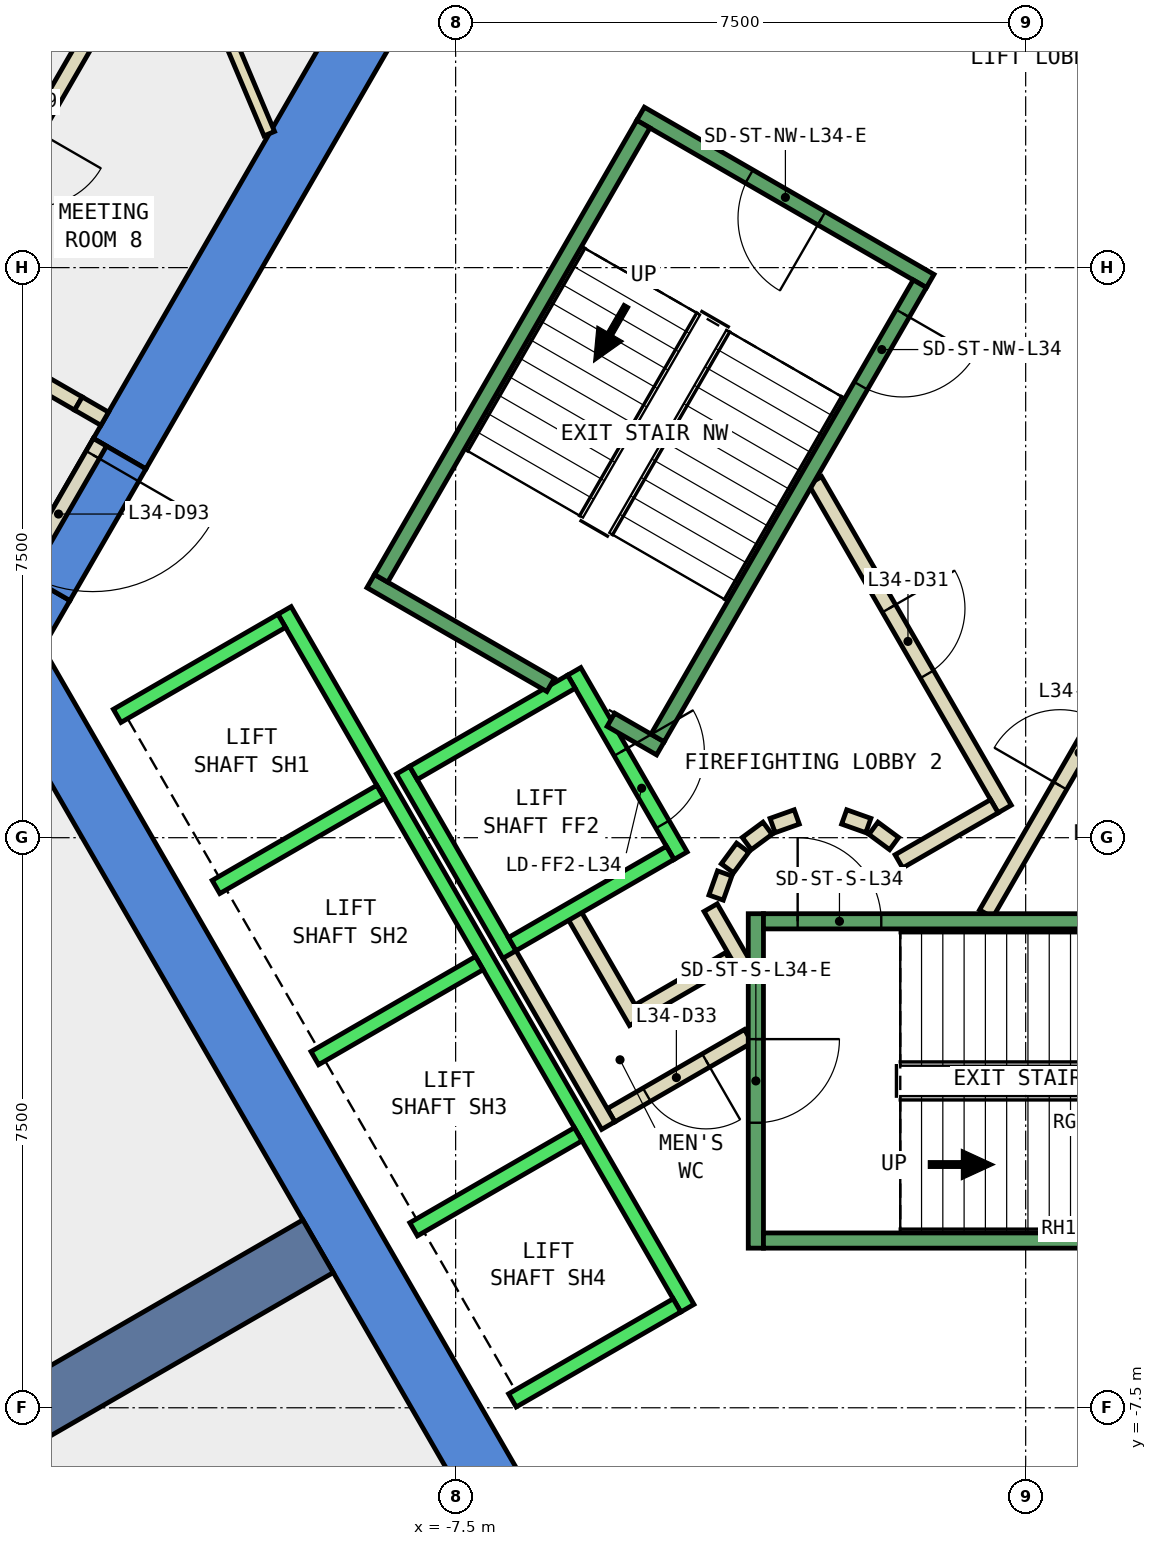
"""IFC4 building model, lengths in metres.
Left out: names, types, materials, properties, quantities, classifications, styles, units other than length and angle.
Written with IfcOpenShell. Run it as: python <this file> out.ifc"""

import sys

from ifc_helpers import new_model, si_unit, direction, frame, frame_2d, origin, place, context, subcontext, project, spatial, polyline, rectangle, outline, extrude, element, fill, save


model = new_model("IFC4")
c1 = context("Model", 3, precision=1e-05, world=origin(), true_north=direction((0.0, 1.0)))
c2 = subcontext(c1, "Body", "Model", "MODEL_VIEW")
j1 = project(units=[si_unit("LENGTHUNIT", "METRE"), si_unit("PLANEANGLEUNIT", "RADIAN")], contexts=[c1])
p1 = place(None, origin())
s1 = spatial("IfcSite", under=j1, at=p1, CompositionType="ELEMENT")
p2 = place(p1, origin())
s2 = spatial("IfcBuilding", under=s1, at=p2, CompositionType="ELEMENT")
p3 = place(p2, frame((0.0, 0.0, 155.0)))
s3 = spatial("IfcBuildingStorey", under=s2, at=p3, CompositionType="ELEMENT", Elevation=155.0)
p4 = place(p3, frame((0.0, 0.0, -0.4)))
e1 = element("IfcWall", 1, at=p4, inside=s3, PredefinedType="SHEAR", context=c2, shape_type="SweptSolid", body=[
    extrude(outline(polyline([(-12.267, 5.252), (-11.575, 4.852), (-6.466, 13.7), (-6.928, 14.5), (-12.267, 5.252)])), origin(), (0.0, 0.0, 1.0), 4.2),
])
p5 = place(p3, frame((0.0, 0.0, -0.4)))
e2 = element("IfcWall", 2, at=p5, inside=s3, PredefinedType="SHEAR", context=c2, shape_type="SweptSolid", body=[
    extrude(outline(polyline([(-12.575, 3.12), (-13.267, 3.52), (-13.856, 2.5), (-12.933, 2.5), (-12.575, 3.12)])), origin(), (0.0, 0.0, 1.0), 4.2),
])
p6 = place(p3, frame((0.0, 0.0, 3.6)))
e3 = element("IfcWall", 3, at=p6, inside=s3, PredefinedType="SHEAR", context=c2, shape_type="SweptSolid", body=[
    extrude(outline(polyline([(-13.267, 3.52), (-12.575, 3.12), (-11.575, 4.852), (-12.267, 5.252), (-13.267, 3.52)])), origin(), (0.0, 0.0, 1.0), 0.2),
])
p7 = place(p3, frame((0.0, 0.0, -0.4)))
e4 = element("IfcWall", 4, at=p7, inside=s3, PredefinedType="SHEAR", context=c2, shape_type="SweptSolid", body=[
    extrude(outline(polyline([(-13.856, 2.5), (-6.928, -9.5), (-6.466, -8.7), (-12.933, 2.5), (-13.856, 2.5)])), origin(), (0.0, 0.0, 1.0), 4.2),
])
p8 = place(p3, frame((-9.31, -5.375, -0.4), z_axis=(0.0, 0.0, 1.0), x_axis=(-0.866017533419, -0.500013631625, 0.0)))
e5 = element("IfcWall", 5, at=p8, inside=s3, PredefinedType="SHEAR", context=c2, shape_type="SweptSolid", body=[
    extrude(rectangle(XDim=9.0, YDim=0.8, at=frame_2d((4.5, 0.0))), origin(), (0.0, 0.0, 1.0), 4.2),
])
p9 = place(p3, frame((-12.067, 10.975, 0.0), z_axis=(0.0, 0.0, 1.0), x_axis=(-0.500215616273, -0.865900881878, 0.0)))
e6 = element("IfcWall", 6, at=p9, inside=s3, PredefinedType="PARTITIONING", context=c2, shape_type="SweptSolid", body=[
    extrude(rectangle(XDim=4.856, YDim=0.2, at=frame_2d((2.428, 0.0))), origin(), (0.0, 0.0, 1.0), 3.8),
])
p10 = place(p9, frame((1.928, 0.0, 0.0)))
e7 = element("IfcOpeningElement", 7, at=p10, cuts=e6, PredefinedType="OPENING", context=c2, shape_type="SweptSolid", body=[
    extrude(rectangle(XDim=1.0, YDim=2.1, at=frame_2d((0.5, 1.05))), frame((0.0, 0.11, 0.0), z_axis=(0.0, -1.0, 0.0), x_axis=(1.0, 0.0, 0.0)), (0.0, 0.0, 1.0), 0.22),
])
p11 = place(p3, frame((-14.359, 6.806, 0.0), z_axis=(0.0, 0.0, 1.0), x_axis=(0.866155875717, -0.499773947861, 0.0)))
e8 = element("IfcWall", 8, at=p11, inside=s3, PredefinedType="PARTITIONING", context=c2, shape_type="SweptSolid", body=[
    extrude(rectangle(XDim=2.189, YDim=0.2, at=frame_2d((1.094, 0.0))), origin(), (0.0, 0.0, 1.0), 3.8),
])
p12 = place(p3, frame((-3.9, -1.599, 0.0), z_axis=(0.0, 0.0, 1.0), x_axis=(-0.865969445389, -0.500096910261, 0.0)))
e9 = element("IfcWall", 9, at=p12, inside=s3, PredefinedType="PARTITIONING", context=c2, shape_type="SweptSolid", body=[
    extrude(rectangle(XDim=1.373, YDim=0.2, at=frame_2d((0.687, 0.0))), origin(), (0.0, 0.0, 1.0), 3.8),
])
p13 = place(p3, frame((-5.126, -2.422, 0.0), z_axis=(0.0, 0.0, 1.0), x_axis=(-0.500062241894, 0.865989465428, 0.0)))
e10 = element("IfcWall", 10, at=p13, inside=s3, PredefinedType="PARTITIONING", context=c2, shape_type="SweptSolid", body=[
    extrude(rectangle(XDim=1.7, YDim=0.2, at=frame_2d((0.85, 0.0))), origin(), (0.0, 0.0, 1.0), 3.8),
])
p14 = place(p3, frame((-3.65, -2.61, 0.0), z_axis=(0.0, 0.0, 1.0), x_axis=(-0.866072462134, -0.499918483688, 0.0)))
e11 = element("IfcWall", 11, at=p14, inside=s3, PredefinedType="PARTITIONING", context=c2, shape_type="SweptSolid", body=[
    extrude(rectangle(XDim=2.084, YDim=0.2, at=frame_2d((1.042, 0.0))), origin(), (0.0, 0.0, 1.0), 3.8),
])
p15 = place(p14, frame((0.642, 0.0, 0.0)))
e12 = element("IfcOpeningElement", 12, at=p15, cuts=e11, PredefinedType="OPENING", context=c2, shape_type="SweptSolid", body=[
    extrude(rectangle(XDim=0.9, YDim=2.1, at=frame_2d((0.45, 1.05))), frame((0.0, 0.11, 0.0), z_axis=(0.0, -1.0, 0.0), x_axis=(1.0, 0.0, 0.0)), (0.0, 0.0, 1.0), 0.22),
])
p16 = place(p3, frame((-5.492, -3.788, 0.0), z_axis=(0.0, 0.0, 1.0), x_axis=(-0.500008949224, 0.866020236886, 0.0)))
e13 = element("IfcWall", 13, at=p16, inside=s3, PredefinedType="PARTITIONING", context=c2, shape_type="SweptSolid", body=[
    extrude(rectangle(XDim=2.68, YDim=0.2, at=frame_2d((1.34, 0.0))), origin(), (0.0, 0.0, 1.0), 3.8),
])
p17 = place(p3, frame((-4.145, -0.92, 0.0), z_axis=(0.0, 0.0, 1.0), x_axis=(0.499743786207, -0.866173278362, 0.0)))
e14 = element("IfcWall", 14, at=p17, inside=s3, PredefinedType="PARTITIONING", context=c2, shape_type="SweptSolid", body=[
    extrude(rectangle(XDim=0.991, YDim=0.2, at=frame_2d((0.495, 0.0))), origin(), (0.0, 0.0, 1.0), 3.8),
])
p18 = place(p3, frame((-9.952, 9.262, 0.0), z_axis=(0.0, 0.0, 1.0), x_axis=(-0.38905491579, 0.921214563769, 0.0)))
e15 = element("IfcWall", 15, at=p18, inside=s3, PredefinedType="PARTITIONING", context=c2, shape_type="SweptSolid", body=[
    extrude(rectangle(XDim=3.445, YDim=0.15, at=frame_2d((1.722, 0.0))), origin(), (0.0, 0.0, 1.0), 3.8),
])
p19 = place(p3, frame((-0.52, -1.0, 0.0), z_axis=(0.0, 0.0, 1.0), x_axis=(0.50011622646, 0.865958290007, 0.0)))
e16 = element("IfcWall", 16, at=p19, inside=s3, PredefinedType="PARTITIONING", context=c2, shape_type="SweptSolid", body=[
    extrude(rectangle(XDim=4.991, YDim=0.2, at=frame_2d((2.496, 0.0))), origin(), (0.0, 0.0, 1.0), 3.8),
])
p20 = place(p19, frame((1.945, 0.0, 0.0)))
e17 = element("IfcOpeningElement", 17, at=p20, cuts=e16, PredefinedType="OPENING", context=c2, shape_type="SweptSolid", body=[
    extrude(rectangle(XDim=1.0, YDim=2.1, at=frame_2d((0.5, 1.05))), frame((0.0, 0.11, 0.0), z_axis=(0.0, -1.0, 0.0), x_axis=(1.0, 0.0, 0.0)), (0.0, 0.0, 1.0), 0.22),
])
p21 = place(p3, frame((-2.771, 4.7, 0.0), z_axis=(0.0, 0.0, 1.0), x_axis=(0.499969479948, -0.866043023828, 0.0)))
e18 = element("IfcWall", 18, at=p21, inside=s3, PredefinedType="PARTITIONING", context=c2, shape_type="SweptSolid", body=[
    extrude(rectangle(XDim=4.99, YDim=0.2, at=frame_2d((2.495, 0.0))), origin(), (0.0, 0.0, 1.0), 3.8),
])
p22 = place(p21, frame((1.945, 0.0, 0.0)))
e19 = element("IfcOpeningElement", 19, at=p22, cuts=e18, PredefinedType="OPENING", context=c2, shape_type="SweptSolid", body=[
    extrude(rectangle(XDim=1.0, YDim=2.1, at=frame_2d((0.5, 1.05))), frame((0.0, 0.11, 0.0), z_axis=(0.0, -1.0, 0.0), x_axis=(1.0, 0.0, 0.0)), (0.0, 0.0, 1.0), 0.22),
])
p23 = place(p3, frame((-0.412, 0.414, 0.0), z_axis=(0.0, 0.0, 1.0), x_axis=(-0.866017369001, -0.500013916395, 0.0)))
e20 = element("IfcWall", 20, at=p23, inside=s3, PredefinedType="PARTITIONING", context=c2, shape_type="SweptSolid", body=[
    extrude(rectangle(XDim=1.45, YDim=0.2, at=frame_2d((0.725, 0.0))), origin(), (0.0, 0.0, 1.0), 3.8),
])
p24 = place(p3, frame((-1.731, -0.077, 0.0), z_axis=(0.0, 0.0, 1.0), x_axis=(-0.804311165252, 0.594208338422, 0.0)))
e21 = element("IfcWall", 21, at=p24, inside=s3, PredefinedType="PARTITIONING", context=c2, shape_type="SweptSolid", body=[
    extrude(rectangle(XDim=0.338, YDim=0.2, at=frame_2d((0.169, 0.0))), origin(), (0.0, 0.0, 1.0), 3.8),
])
p25 = place(p3, frame((-2.07, 0.16, 0.0), z_axis=(0.0, 0.0, 1.0), x_axis=(-0.942199461132, 0.335052496547, 0.0)))
e22 = element("IfcWall", 22, at=p25, inside=s3, PredefinedType="PARTITIONING", context=c2, shape_type="SweptSolid", body=[
    extrude(rectangle(XDim=0.337, YDim=0.2, at=frame_2d((0.169, 0.0))), origin(), (0.0, 0.0, 1.0), 3.8),
])
p26 = place(p3, frame((-3.012, 0.273, 0.0), z_axis=(0.0, 0.0, 1.0), x_axis=(-0.942280615813, -0.334824194261, 0.0)))
e23 = element("IfcWall", 23, at=p26, inside=s3, PredefinedType="PARTITIONING", context=c2, shape_type="SweptSolid", body=[
    extrude(rectangle(XDim=0.338, YDim=0.2, at=frame_2d((0.169, 0.0))), origin(), (0.0, 0.0, 1.0), 3.8),
])
p27 = place(p3, frame((-3.397, 0.124, 0.0), z_axis=(0.0, 0.0, 1.0), x_axis=(-0.804311165252, -0.594208338422, 0.0)))
e24 = element("IfcWall", 24, at=p27, inside=s3, PredefinedType="PARTITIONING", context=c2, shape_type="SweptSolid", body=[
    extrude(rectangle(XDim=0.338, YDim=0.2, at=frame_2d((0.169, 0.0))), origin(), (0.0, 0.0, 1.0), 3.8),
])
p28 = place(p3, frame((-3.723, -0.131, 0.0), z_axis=(0.0, 0.0, 1.0), x_axis=(-0.594675113454, -0.803966112121, 0.0)))
e25 = element("IfcWall", 25, at=p28, inside=s3, PredefinedType="PARTITIONING", context=c2, shape_type="SweptSolid", body=[
    extrude(rectangle(XDim=0.338, YDim=0.2, at=frame_2d((0.169, 0.0))), origin(), (0.0, 0.0, 1.0), 3.8),
])
p29 = place(p3, frame((-3.96, -0.47, 0.0), z_axis=(0.0, 0.0, 1.0), x_axis=(-0.334824194261, -0.942280615813, 0.0)))
e26 = element("IfcWall", 26, at=p29, inside=s3, PredefinedType="PARTITIONING", context=c2, shape_type="SweptSolid", body=[
    extrude(rectangle(XDim=0.338, YDim=0.2, at=frame_2d((0.169, 0.0))), origin(), (0.0, 0.0, 1.0), 3.8),
])
p30 = place(p3, frame((-12.18, 5.202, 0.0), z_axis=(0.0, 0.0, 1.0), x_axis=(-0.50002537861, -0.866010750942, 0.0)))
e27 = element("IfcWall", 27, at=p30, inside=s3, PredefinedType="PARTITIONING", context=c2, shape_type="SweptSolid", body=[
    extrude(rectangle(XDim=2.0, YDim=0.2, at=frame_2d((1.0, 0.0))), origin(), (0.0, 0.0, 1.0), 2.4),
])
p31 = place(p30, frame((0.19, 0.0, 0.0)))
e28 = element("IfcOpeningElement", 28, at=p31, cuts=e27, PredefinedType="OPENING", context=c2, shape_type="SweptSolid", body=[
    extrude(rectangle(XDim=1.8, YDim=2.1, at=frame_2d((0.9, 1.05))), frame((0.0, 0.11, 0.0), z_axis=(0.0, -1.0, 0.0), x_axis=(1.0, 0.0, 0.0)), (0.0, 0.0, 1.0), 0.22),
])
p32 = place(p3, frame((-12.463, 5.712, 0.0), z_axis=(0.0, 0.0, 1.0), x_axis=(0.865788603161, -0.500409926597, 0.0)))
e29 = element("IfcWall", 29, at=p32, inside=s3, PredefinedType="PARTITIONING", context=c2, shape_type="SweptSolid", body=[
    extrude(rectangle(XDim=0.4, YDim=0.2, at=frame_2d((0.2, 0.0))), origin(), (0.0, 0.0, 1.0), 2.4),
])
p33 = place(p3, frame((-5.94, 2.188, 0.0), z_axis=(0.0, 0.0, 1.0), x_axis=(0.49994636267, -0.866056369097, 0.0)))
e30 = element("IfcWall", 30, at=p33, inside=s3, PredefinedType="STANDARD", context=c2, shape_type="SweptSolid", body=[
    extrude(rectangle(XDim=2.8, YDim=0.2, at=frame_2d((1.4, 0.0))), origin(), (0.0, 0.0, 1.0), 3.8),
])
p34 = place(p33, frame((1.225, 0.0, 0.0)))
e31 = element("IfcOpeningElement", 31, at=p34, cuts=e30, PredefinedType="OPENING", context=c2, shape_type="SweptSolid", body=[
    extrude(rectangle(XDim=1.1, YDim=2.1, at=frame_2d((0.55, 1.05))), frame((0.0, 0.11, 0.0), z_axis=(0.0, -1.0, 0.0), x_axis=(1.0, 0.0, 0.0)), (0.0, 0.0, 1.0), 0.22),
])
p35 = place(p3, frame((-8.192, 0.888, 0.0), z_axis=(0.0, 0.0, 1.0), x_axis=(0.49994636267, -0.866056369097, 0.0)))
e32 = element("IfcWall", 32, at=p35, inside=s3, PredefinedType="STANDARD", context=c2, shape_type="SweptSolid", body=[
    extrude(rectangle(XDim=2.8, YDim=0.2, at=frame_2d((1.4, 0.0))), origin(), (0.0, 0.0, 1.0), 3.8),
])
for number, where, z_axis, x_axis in (
    (33, (-5.977, 2.052, 0.0), (0.0, 0.0, 1.0), (-0.866, -0.5, 0.0)),
    (34, (-4.677, -0.2, 0.0), (0.0, 0.0, 1.0), (-0.866, -0.5, 0.0)),
):
    element("IfcWall", number, at=place(p3, frame(where, z_axis=z_axis, x_axis=x_axis)), inside=s3, PredefinedType="STANDARD", context=c2, shape_type="SweptSolid", body=[
        extrude(rectangle(XDim=2.399, YDim=0.2, at=frame_2d((1.2, 0.0))), origin(), (0.0, 0.0, 1.0), 3.8),
    ])
p36 = place(p3, frame((-9.751, 2.99, 0.0), z_axis=(0.0, 0.0, 1.0), x_axis=(0.50000090737, -0.866024879913, 0.0)))
e35 = element("IfcWall", 35, at=p36, inside=s3, PredefinedType="STANDARD", context=c2, shape_type="SweptSolid", body=[
    extrude(rectangle(XDim=10.6, YDim=0.2, at=frame_2d((5.3, 0.0))), origin(), (0.0, 0.0, 1.0), 3.8),
])
p37 = place(p3, frame((-9.788, 2.853, 0.0), z_axis=(0.0, 0.0, 1.0), x_axis=(-0.865998541277, -0.500046524342, 0.0)))
e36 = element("IfcWall", 36, at=p37, inside=s3, PredefinedType="STANDARD", context=c2, shape_type="SweptSolid", body=[
    extrude(rectangle(XDim=2.5, YDim=0.2, at=frame_2d((1.25, 0.0))), origin(), (0.0, 0.0, 1.0), 3.8),
])
for number, where, z_axis, x_axis in (
    (37, (-8.488, 0.602, 0.0), (0.0, 0.0, 1.0), (-0.866, -0.5, 0.0)),
    (38, (-7.188, -1.65, 0.0), (0.0, 0.0, 1.0), (-0.866, -0.5, 0.0)),
    (39, (-5.888, -3.902, 0.0), (0.0, 0.0, 1.0), (-0.866, -0.5, 0.0)),
    (40, (-4.588, -6.153, 0.0), (0.0, 0.0, 1.0), (-0.866, -0.5, 0.0)),
):
    element("IfcWall", number, at=place(p3, frame(where, z_axis=z_axis, x_axis=x_axis)), inside=s3, PredefinedType="STANDARD", context=c2, shape_type="SweptSolid", body=[
        extrude(rectangle(XDim=2.5, YDim=0.2, at=frame_2d((1.25, 0.0))), origin(), (0.0, 0.0, 1.0), 3.8),
    ])
p38 = place(p3, frame((-3.55, -1.0, 0.0), z_axis=(0.0, 0.0, 1.0), x_axis=(0.0, -1.0, 0.0)))
e41 = element("IfcWall", 41, at=p38, inside=s3, PredefinedType="STANDARD", context=c2, shape_type="SweptSolid", body=[
    extrude(rectangle(XDim=4.4, YDim=0.2, at=frame_2d((2.2, 0.0))), origin(), (0.0, 0.0, 1.0), 3.8),
])
p39 = place(p38, frame((1.65, 0.0, 0.0)))
e42 = element("IfcOpeningElement", 42, at=p39, cuts=e41, PredefinedType="OPENING", context=c2, shape_type="SweptSolid", body=[
    extrude(rectangle(XDim=1.1, YDim=2.2, at=frame_2d((0.55, 1.1))), frame((0.0, 0.11, 0.0), z_axis=(0.0, -1.0, 0.0), x_axis=(1.0, 0.0, 0.0)), (0.0, 0.0, 1.0), 0.22),
])
p40 = place(p3, frame((-3.45, -1.1, 0.0), z_axis=(0.0, 0.0, 1.0), x_axis=(1.0, 0.0, 0.0)))
e43 = element("IfcWall", 43, at=p40, inside=s3, PredefinedType="STANDARD", context=c2, shape_type="SweptSolid", body=[
    extrude(rectangle(XDim=6.9, YDim=0.2, at=frame_2d((3.45, 0.0))), origin(), (0.0, 0.0, 1.0), 3.8),
])
p41 = place(p40, frame((0.45, 0.0, 0.0)))
e44 = element("IfcOpeningElement", 44, at=p41, cuts=e43, PredefinedType="OPENING", context=c2, shape_type="SweptSolid", body=[
    extrude(rectangle(XDim=1.1, YDim=2.2, at=frame_2d((0.55, 1.1))), frame((0.0, 0.11, 0.0), z_axis=(0.0, -1.0, 0.0), x_axis=(1.0, 0.0, 0.0)), (0.0, 0.0, 1.0), 0.22),
])
p42 = place(p3, frame((-3.45, -5.3, 0.0), z_axis=(0.0, 0.0, 1.0), x_axis=(1.0, 0.0, 0.0)))
e45 = element("IfcWall", 45, at=p42, inside=s3, PredefinedType="STANDARD", context=c2, shape_type="SweptSolid", body=[
    extrude(rectangle(XDim=6.9, YDim=0.2, at=frame_2d((3.45, 0.0))), origin(), (0.0, 0.0, 1.0), 3.8),
])
p43 = place(p3, frame((-1.256, 7.324, 0.0), z_axis=(0.0, 0.0, 1.0), x_axis=(-0.866046073146, 0.499964197906, 0.0)))
e46 = element("IfcWall", 46, at=p43, inside=s3, PredefinedType="STANDARD", context=c2, shape_type="SweptSolid", body=[
    extrude(rectangle(XDim=4.4, YDim=0.2, at=frame_2d((2.2, 0.0))), origin(), (0.0, 0.0, 1.0), 3.8),
])
p44 = place(p43, frame((1.65, 0.0, 0.0)))
e47 = element("IfcOpeningElement", 47, at=p44, cuts=e46, PredefinedType="OPENING", context=c2, shape_type="SweptSolid", body=[
    extrude(rectangle(XDim=1.1, YDim=2.2, at=frame_2d((0.55, 1.1))), frame((0.0, 0.11, 0.0), z_axis=(0.0, -1.0, 0.0), x_axis=(1.0, 0.0, 0.0)), (0.0, 0.0, 1.0), 0.22),
])
p45 = place(p3, frame((-6.25, 2.01, 0.0), z_axis=(0.0, 0.0, 1.0), x_axis=(-0.86611865017, 0.499838457731, 0.0)))
e48 = element("IfcWall", 48, at=p45, inside=s3, PredefinedType="STANDARD", context=c2, shape_type="SweptSolid", body=[
    extrude(rectangle(XDim=2.733, YDim=0.2, at=frame_2d((1.366, 0.0))), origin(), (0.0, 0.0, 1.0), 3.8),
])
p46 = place(p3, frame((-4.806, 1.176, 0.0), z_axis=(0.0, 0.0, 1.0), x_axis=(-0.866558586415, 0.499075361355, 0.0)))
e49 = element("IfcWall", 49, at=p46, inside=s3, PredefinedType="STANDARD", context=c2, shape_type="SweptSolid", body=[
    extrude(rectangle(XDim=0.751, YDim=0.2, at=frame_2d((0.376, 0.0))), origin(), (0.0, 0.0, 1.0), 3.8),
])
p47 = place(p3, frame((-1.393, 7.288, 0.0), z_axis=(0.0, 0.0, 1.0), x_axis=(-0.499963383562, -0.866046543262, 0.0)))
e50 = element("IfcWall", 50, at=p47, inside=s3, PredefinedType="STANDARD", context=c2, shape_type="SweptSolid", body=[
    extrude(rectangle(XDim=6.9, YDim=0.2, at=frame_2d((3.45, 0.0))), origin(), (0.0, 0.0, 1.0), 3.8),
])
p48 = place(p47, frame((0.45, 0.0, 0.0)))
e51 = element("IfcOpeningElement", 51, at=p48, cuts=e50, PredefinedType="OPENING", context=c2, shape_type="SweptSolid", body=[
    extrude(rectangle(XDim=1.1, YDim=2.2, at=frame_2d((0.55, 1.1))), frame((0.0, 0.11, 0.0), z_axis=(0.0, -1.0, 0.0), x_axis=(1.0, 0.0, 0.0)), (0.0, 0.0, 1.0), 0.22),
])
p49 = place(p3, frame((-5.03, 9.388, 0.0), z_axis=(0.0, 0.0, 1.0), x_axis=(-0.499978703459, -0.866037698999, 0.0)))
e52 = element("IfcWall", 52, at=p49, inside=s3, PredefinedType="STANDARD", context=c2, shape_type="SweptSolid", body=[
    extrude(rectangle(XDim=6.9, YDim=0.2, at=frame_2d((3.45, 0.0))), origin(), (0.0, 0.0, 1.0), 3.8),
])
p50 = place(p20, origin())
e53 = element("IfcDoor", 53, at=p50, inside=s3, OperationType="SINGLE_SWING_LEFT", PredefinedType="DOOR", context=c2, shape_type="SweptSolid", body=[
    extrude(rectangle(XDim=1.0, YDim=2.1, at=frame_2d((0.5, 1.05))), frame((0.0, 0.025, 0.0), z_axis=(0.0, -1.0, 0.0), x_axis=(1.0, 0.0, 0.0)), (0.0, 0.0, 1.0), 0.05),
])
fill(e17, e53)
p51 = place(p22, origin())
e54 = element("IfcDoor", 54, at=p51, inside=s3, OperationType="SINGLE_SWING_RIGHT", PredefinedType="DOOR", context=c2, shape_type="SweptSolid", body=[
    extrude(rectangle(XDim=1.0, YDim=2.1, at=frame_2d((0.5, 1.05))), frame((0.0, 0.025, 0.0), z_axis=(0.0, -1.0, 0.0), x_axis=(1.0, 0.0, 0.0)), (0.0, 0.0, 1.0), 0.05),
])
fill(e19, e54)
p52 = place(p15, origin())
e55 = element("IfcDoor", 55, at=p52, inside=s3, OperationType="SINGLE_SWING_LEFT", PredefinedType="DOOR", context=c2, shape_type="SweptSolid", body=[
    extrude(rectangle(XDim=0.9, YDim=2.1, at=frame_2d((0.45, 1.05))), frame((0.0, 0.025, 0.0), z_axis=(0.0, -1.0, 0.0), x_axis=(1.0, 0.0, 0.0)), (0.0, 0.0, 1.0), 0.05),
])
fill(e12, e55)
p53 = place(p31, origin())
e56 = element("IfcDoor", 56, at=p53, inside=s3, OperationType="DOUBLE_DOOR_SINGLE_SWING", PredefinedType="DOOR", context=c2, shape_type="SweptSolid", body=[
    extrude(rectangle(XDim=1.8, YDim=2.1, at=frame_2d((0.9, 1.05))), frame((0.0, 0.025, 0.0), z_axis=(0.0, -1.0, 0.0), x_axis=(1.0, 0.0, 0.0)), (0.0, 0.0, 1.0), 0.05),
])
fill(e28, e56)
p54 = place(p34, origin())
e57 = element("IfcDoor", 57, at=p54, inside=s3, OperationType="SLIDING_TO_LEFT", PredefinedType="DOOR", context=c2, shape_type="SweptSolid", body=[
    extrude(rectangle(XDim=1.1, YDim=2.1, at=frame_2d((0.55, 1.05))), frame((0.0, 0.025, 0.0), z_axis=(0.0, -1.0, 0.0), x_axis=(1.0, 0.0, 0.0)), (0.0, 0.0, 1.0), 0.05),
])
fill(e31, e57)
p55 = place(p41, origin())
e58 = element("IfcDoor", 58, at=p55, inside=s3, OperationType="SINGLE_SWING_LEFT", PredefinedType="DOOR", context=c2, shape_type="SweptSolid", body=[
    extrude(rectangle(XDim=1.1, YDim=2.2, at=frame_2d((0.55, 1.1))), frame((0.0, 0.025, 0.0), z_axis=(0.0, -1.0, 0.0), x_axis=(1.0, 0.0, 0.0)), (0.0, 0.0, 1.0), 0.05),
])
fill(e44, e58)
p56 = place(p39, origin())
e59 = element("IfcDoor", 59, at=p56, inside=s3, OperationType="SINGLE_SWING_LEFT", PredefinedType="DOOR", context=c2, shape_type="SweptSolid", body=[
    extrude(rectangle(XDim=1.1, YDim=2.2, at=frame_2d((0.55, 1.1))), frame((0.0, 0.025, 0.0), z_axis=(0.0, -1.0, 0.0), x_axis=(1.0, 0.0, 0.0)), (0.0, 0.0, 1.0), 0.05),
])
fill(e42, e59)
p57 = place(p48, origin())
e60 = element("IfcDoor", 60, at=p57, inside=s3, OperationType="SINGLE_SWING_LEFT", PredefinedType="DOOR", context=c2, shape_type="SweptSolid", body=[
    extrude(rectangle(XDim=1.1, YDim=2.2, at=frame_2d((0.55, 1.1))), frame((0.0, 0.025, 0.0), z_axis=(0.0, -1.0, 0.0), x_axis=(1.0, 0.0, 0.0)), (0.0, 0.0, 1.0), 0.05),
])
fill(e51, e60)
p58 = place(p44, origin())
e61 = element("IfcDoor", 61, at=p58, inside=s3, OperationType="SINGLE_SWING_LEFT", PredefinedType="DOOR", context=c2, shape_type="SweptSolid", body=[
    extrude(rectangle(XDim=1.1, YDim=2.2, at=frame_2d((0.55, 1.1))), frame((0.0, 0.025, 0.0), z_axis=(0.0, -1.0, 0.0), x_axis=(1.0, 0.0, 0.0)), (0.0, 0.0, 1.0), 0.05),
])
fill(e47, e61)
save(model, sys.argv[1])
